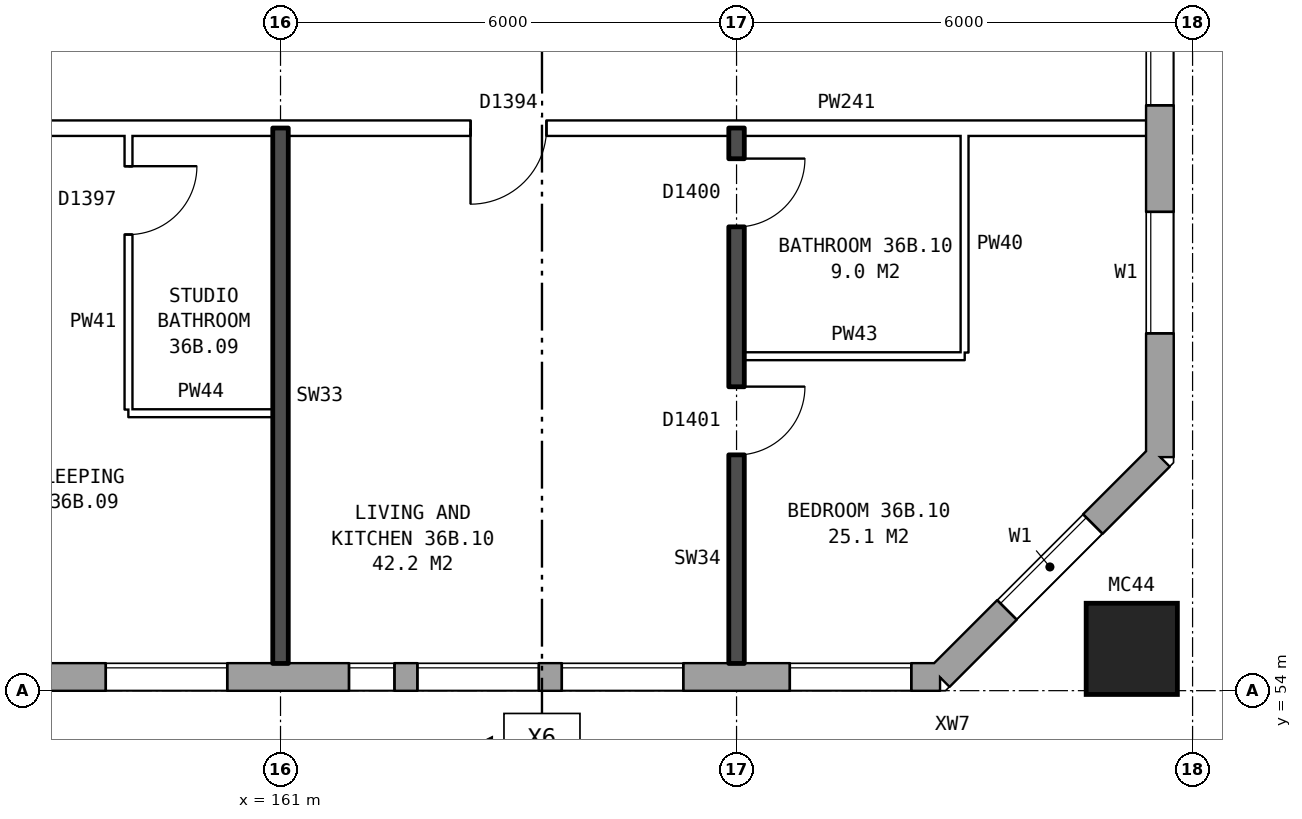
"""IFC4 building model, lengths in metres.
Left out: names, types, materials, properties, quantities, classifications, styles, units other than length and angle.
Written with IfcOpenShell. Run it as: python <this file> out.ifc"""

import sys

from ifc_helpers import new_model, si_unit, direction, frame, frame_2d, origin, origin_2d, place, context, subcontext, project, spatial, rectangle, hollow_rectangle, extrude, element, fill, save


model = new_model("IFC4")
c1 = context("Model", 3, precision=1e-05, world=origin(), true_north=direction((0.0, 1.0)))
c2 = subcontext(c1, "Body", "Model", "MODEL_VIEW")
j1 = project(units=[si_unit("LENGTHUNIT", "METRE"), si_unit("PLANEANGLEUNIT", "RADIAN")], contexts=[c1])
p1 = place(None, origin())
s1 = spatial("IfcSite", under=j1, at=p1, CompositionType="ELEMENT")
p2 = place(p1, origin())
s2 = spatial("IfcBuilding", under=s1, at=p2, CompositionType="ELEMENT")
p3 = place(p2, frame((0.0, 0.0, 129.9)))
s3 = spatial("IfcBuildingStorey", under=s2, at=p3, CompositionType="ELEMENT", Elevation=129.9)
p4 = place(p3, frame((172.2, 54.55, 0.0), z_axis=(0.0, 0.0, 1.0), x_axis=(1.0, 0.0, 0.0)))
e1 = element("IfcColumn", 1, at=p4, inside=s3, PredefinedType="COLUMN", context=c2, shape_type="SweptSolid", body=[
    extrude(hollow_rectangle(XDim=1.2, YDim=1.2, WallThickness=0.065, at=origin_2d()), origin(), (0.0, 0.0, 1.0), 3.1),
])
p5 = place(p3, frame((134.075, 54.18, 0.0), z_axis=(0.0, 0.0, 1.0), x_axis=(1.0, 0.0, 0.0)))
e2 = element("IfcWall", 2, at=p5, inside=s3, PredefinedType="STANDARD", context=c2, shape_type="SweptSolid", body=[
    extrude(rectangle(XDim=35.601, YDim=0.36, at=frame_2d((17.8, 0.0))), origin(), (0.0, 0.0, 1.0), 2.85),
])
p6 = place(p5, frame((0.625, 0.0, 0.8)))
e3 = element("IfcOpeningElement", 3, at=p6, cuts=e2, PredefinedType="OPENING", context=c2, shape_type="SweptSolid", body=[
    extrude(rectangle(XDim=1.6, YDim=1.8, at=frame_2d((0.8, 0.9))), frame((0.0, 0.19, 0.0), z_axis=(0.0, -1.0, 0.0), x_axis=(1.0, 0.0, 0.0)), (0.0, 0.0, 1.0), 0.38),
])
p7 = place(p5, frame((3.625, 0.0, 0.8)))
e4 = element("IfcOpeningElement", 4, at=p7, cuts=e2, PredefinedType="OPENING", context=c2, shape_type="SweptSolid", body=[
    extrude(rectangle(XDim=1.6, YDim=1.8, at=frame_2d((0.8, 0.9))), frame((0.0, 0.19, 0.0), z_axis=(0.0, -1.0, 0.0), x_axis=(1.0, 0.0, 0.0)), (0.0, 0.0, 1.0), 0.38),
])
p8 = place(p5, frame((5.525, 0.0, 0.8)))
e5 = element("IfcOpeningElement", 5, at=p8, cuts=e2, PredefinedType="OPENING", context=c2, shape_type="SweptSolid", body=[
    extrude(rectangle(XDim=1.2, YDim=1.8, at=frame_2d((0.6, 0.9))), frame((0.0, 0.19, 0.0), z_axis=(0.0, -1.0, 0.0), x_axis=(1.0, 0.0, 0.0)), (0.0, 0.0, 1.0), 0.38),
])
p9 = place(p5, frame((9.625, 0.0, 0.8)))
e6 = element("IfcOpeningElement", 6, at=p9, cuts=e2, PredefinedType="OPENING", context=c2, shape_type="SweptSolid", body=[
    extrude(rectangle(XDim=1.6, YDim=1.8, at=frame_2d((0.8, 0.9))), frame((0.0, 0.19, 0.0), z_axis=(0.0, -1.0, 0.0), x_axis=(1.0, 0.0, 0.0)), (0.0, 0.0, 1.0), 0.38),
])
p10 = place(p5, frame((12.625, 0.0, 0.8)))
e7 = element("IfcOpeningElement", 7, at=p10, cuts=e2, PredefinedType="OPENING", context=c2, shape_type="SweptSolid", body=[
    extrude(rectangle(XDim=1.6, YDim=1.8, at=frame_2d((0.8, 0.9))), frame((0.0, 0.19, 0.0), z_axis=(0.0, -1.0, 0.0), x_axis=(1.0, 0.0, 0.0)), (0.0, 0.0, 1.0), 0.38),
])
p11 = place(p5, frame((15.625, 0.0, 0.8)))
e8 = element("IfcOpeningElement", 8, at=p11, cuts=e2, PredefinedType="OPENING", context=c2, shape_type="SweptSolid", body=[
    extrude(rectangle(XDim=1.6, YDim=1.8, at=frame_2d((0.8, 0.9))), frame((0.0, 0.19, 0.0), z_axis=(0.0, -1.0, 0.0), x_axis=(1.0, 0.0, 0.0)), (0.0, 0.0, 1.0), 0.38),
])
p12 = place(p5, frame((18.625, 0.0, 0.8)))
e9 = element("IfcOpeningElement", 9, at=p12, cuts=e2, PredefinedType="OPENING", context=c2, shape_type="SweptSolid", body=[
    extrude(rectangle(XDim=1.6, YDim=1.8, at=frame_2d((0.8, 0.9))), frame((0.0, 0.19, 0.0), z_axis=(0.0, -1.0, 0.0), x_axis=(1.0, 0.0, 0.0)), (0.0, 0.0, 1.0), 0.38),
])
p13 = place(p5, frame((21.625, 0.0, 0.8)))
e10 = element("IfcOpeningElement", 10, at=p13, cuts=e2, PredefinedType="OPENING", context=c2, shape_type="SweptSolid", body=[
    extrude(rectangle(XDim=1.6, YDim=1.8, at=frame_2d((0.8, 0.9))), frame((0.0, 0.19, 0.0), z_axis=(0.0, -1.0, 0.0), x_axis=(1.0, 0.0, 0.0)), (0.0, 0.0, 1.0), 0.38),
])
p14 = place(p5, frame((24.625, 0.0, 0.8)))
e11 = element("IfcOpeningElement", 11, at=p14, cuts=e2, PredefinedType="OPENING", context=c2, shape_type="SweptSolid", body=[
    extrude(rectangle(XDim=1.6, YDim=1.8, at=frame_2d((0.8, 0.9))), frame((0.0, 0.19, 0.0), z_axis=(0.0, -1.0, 0.0), x_axis=(1.0, 0.0, 0.0)), (0.0, 0.0, 1.0), 0.38),
])
p15 = place(p5, frame((27.825, 0.0, 1.7)))
e12 = element("IfcOpeningElement", 12, at=p15, cuts=e2, PredefinedType="OPENING", context=c2, shape_type="SweptSolid", body=[
    extrude(rectangle(XDim=0.6, YDim=0.9, at=frame_2d((0.3, 0.45))), frame((0.0, 0.19, 0.0), z_axis=(0.0, -1.0, 0.0), x_axis=(1.0, 0.0, 0.0)), (0.0, 0.0, 1.0), 0.38),
])
p16 = place(p5, frame((30.625, 0.0, 0.8)))
e13 = element("IfcOpeningElement", 13, at=p16, cuts=e2, PredefinedType="OPENING", context=c2, shape_type="SweptSolid", body=[
    extrude(rectangle(XDim=1.6, YDim=1.8, at=frame_2d((0.8, 0.9))), frame((0.0, 0.19, 0.0), z_axis=(0.0, -1.0, 0.0), x_axis=(1.0, 0.0, 0.0)), (0.0, 0.0, 1.0), 0.38),
])
p17 = place(p5, frame((33.625, 0.0, 0.8)))
e14 = element("IfcOpeningElement", 14, at=p17, cuts=e2, PredefinedType="OPENING", context=c2, shape_type="SweptSolid", body=[
    extrude(rectangle(XDim=1.6, YDim=1.8, at=frame_2d((0.8, 0.9))), frame((0.0, 0.19, 0.0), z_axis=(0.0, -1.0, 0.0), x_axis=(1.0, 0.0, 0.0)), (0.0, 0.0, 1.0), 0.38),
])
p18 = place(p5, frame((7.025, 0.0, 1.6)))
e15 = element("IfcOpeningElement", 15, at=p18, cuts=e2, PredefinedType="OPENING", context=c2, shape_type="SweptSolid", body=[
    extrude(rectangle(XDim=0.6, YDim=0.9, at=frame_2d((0.3, 0.45))), frame((0.0, 0.19, 0.0), z_axis=(0.0, -1.0, 0.0), x_axis=(1.0, 0.0, 0.0)), (0.0, 0.0, 1.0), 0.38),
])
p19 = place(p5, frame((28.725, 0.0, 0.8)))
e16 = element("IfcOpeningElement", 16, at=p19, cuts=e2, PredefinedType="OPENING", context=c2, shape_type="SweptSolid", body=[
    extrude(rectangle(XDim=1.6, YDim=1.8, at=frame_2d((0.8, 0.9))), frame((0.0, 0.19, 0.0), z_axis=(0.0, -1.0, 0.0), x_axis=(1.0, 0.0, 0.0)), (0.0, 0.0, 1.0), 0.38),
])
p20 = place(p3, frame((169.675, 54.18, 0.0), z_axis=(0.0, 0.0, 1.0), x_axis=(0.707106781187, 0.707106781187, 0.0)))
e17 = element("IfcWall", 17, at=p20, inside=s3, PredefinedType="STANDARD", context=c2, shape_type="SweptSolid", body=[
    extrude(rectangle(XDim=4.094, YDim=0.36, at=frame_2d((2.047, 0.0))), origin(), (0.0, 0.0, 1.0), 2.85),
])
p21 = place(p20, frame((1.247, 0.0, 0.8)))
e18 = element("IfcOpeningElement", 18, at=p21, cuts=e17, PredefinedType="OPENING", context=c2, shape_type="SweptSolid", body=[
    extrude(rectangle(XDim=1.6, YDim=1.8, at=frame_2d((0.8, 0.9))), frame((0.0, 0.19, 0.0), z_axis=(0.0, -1.0, 0.0), x_axis=(1.0, 0.0, 0.0)), (0.0, 0.0, 1.0), 0.38),
])
p22 = place(p3, frame((172.57, 57.075, 0.0), z_axis=(0.0, 0.0, 1.0), x_axis=(0.0, 1.0, 0.0)))
e19 = element("IfcWall", 19, at=p22, inside=s3, PredefinedType="STANDARD", context=c2, shape_type="SweptSolid", body=[
    extrude(rectangle(XDim=25.851, YDim=0.36, at=frame_2d((12.925, 0.0))), origin(), (0.0, 0.0, 1.0), 2.85),
])
p23 = place(p22, frame((1.625, 0.0, 0.8)))
e20 = element("IfcOpeningElement", 20, at=p23, cuts=e19, PredefinedType="OPENING", context=c2, shape_type="SweptSolid", body=[
    extrude(rectangle(XDim=1.6, YDim=1.8, at=frame_2d((0.8, 0.9))), frame((0.0, 0.19, 0.0), z_axis=(0.0, -1.0, 0.0), x_axis=(1.0, 0.0, 0.0)), (0.0, 0.0, 1.0), 0.38),
])
p24 = place(p22, frame((4.625, 0.0, 0.8)))
e21 = element("IfcOpeningElement", 21, at=p24, cuts=e19, PredefinedType="OPENING", context=c2, shape_type="SweptSolid", body=[
    extrude(rectangle(XDim=1.6, YDim=1.8, at=frame_2d((0.8, 0.9))), frame((0.0, 0.19, 0.0), z_axis=(0.0, -1.0, 0.0), x_axis=(1.0, 0.0, 0.0)), (0.0, 0.0, 1.0), 0.38),
])
p25 = place(p22, frame((7.625, 0.0, 0.8)))
e22 = element("IfcOpeningElement", 22, at=p25, cuts=e19, PredefinedType="OPENING", context=c2, shape_type="SweptSolid", body=[
    extrude(rectangle(XDim=1.6, YDim=1.8, at=frame_2d((0.8, 0.9))), frame((0.0, 0.19, 0.0), z_axis=(0.0, -1.0, 0.0), x_axis=(1.0, 0.0, 0.0)), (0.0, 0.0, 1.0), 0.38),
])
p26 = place(p22, frame((6.525, 0.0, 0.8)))
e23 = element("IfcOpeningElement", 23, at=p26, cuts=e19, PredefinedType="OPENING", context=c2, shape_type="SweptSolid", body=[
    extrude(rectangle(XDim=0.8, YDim=1.8, at=frame_2d((0.4, 0.9))), frame((0.0, 0.19, 0.0), z_axis=(0.0, -1.0, 0.0), x_axis=(1.0, 0.0, 0.0)), (0.0, 0.0, 1.0), 0.38),
])
p27 = place(p22, frame((9.525, 0.0, 0.8)))
e24 = element("IfcOpeningElement", 24, at=p27, cuts=e19, PredefinedType="OPENING", context=c2, shape_type="SweptSolid", body=[
    extrude(rectangle(XDim=1.4, YDim=1.2, at=frame_2d((0.7, 0.6))), frame((0.0, 0.19, 0.0), z_axis=(0.0, -1.0, 0.0), x_axis=(1.0, 0.0, 0.0)), (0.0, 0.0, 1.0), 0.38),
])
p28 = place(p22, frame((16.625, 0.0, 0.8)))
e25 = element("IfcOpeningElement", 25, at=p28, cuts=e19, PredefinedType="OPENING", context=c2, shape_type="SweptSolid", body=[
    extrude(rectangle(XDim=1.6, YDim=1.8, at=frame_2d((0.8, 0.9))), frame((0.0, 0.19, 0.0), z_axis=(0.0, -1.0, 0.0), x_axis=(1.0, 0.0, 0.0)), (0.0, 0.0, 1.0), 0.38),
])
p29 = place(p22, frame((19.625, 0.0, 0.8)))
e26 = element("IfcOpeningElement", 26, at=p29, cuts=e19, PredefinedType="OPENING", context=c2, shape_type="SweptSolid", body=[
    extrude(rectangle(XDim=1.6, YDim=1.8, at=frame_2d((0.8, 0.9))), frame((0.0, 0.19, 0.0), z_axis=(0.0, -1.0, 0.0), x_axis=(1.0, 0.0, 0.0)), (0.0, 0.0, 1.0), 0.38),
])
p30 = place(p22, frame((22.625, 0.0, 0.8)))
e27 = element("IfcOpeningElement", 27, at=p30, cuts=e19, PredefinedType="OPENING", context=c2, shape_type="SweptSolid", body=[
    extrude(rectangle(XDim=1.6, YDim=1.8, at=frame_2d((0.8, 0.9))), frame((0.0, 0.19, 0.0), z_axis=(0.0, -1.0, 0.0), x_axis=(1.0, 0.0, 0.0)), (0.0, 0.0, 1.0), 0.38),
])
p31 = place(p22, frame((12.275, 0.0, 0.8)))
e28 = element("IfcOpeningElement", 28, at=p31, cuts=e19, PredefinedType="OPENING", context=c2, shape_type="SweptSolid", body=[
    extrude(rectangle(XDim=1.2, YDim=1.8, at=frame_2d((0.6, 0.9))), frame((0.0, 0.19, 0.0), z_axis=(0.0, -1.0, 0.0), x_axis=(1.0, 0.0, 0.0)), (0.0, 0.0, 1.0), 0.38),
])
p32 = place(p22, frame((14.425, 0.0, 0.8)))
e29 = element("IfcOpeningElement", 29, at=p32, cuts=e19, PredefinedType="OPENING", context=c2, shape_type="SweptSolid", body=[
    extrude(rectangle(XDim=1.2, YDim=0.9, at=frame_2d((0.6, 0.45))), frame((0.0, 0.19, 0.0), z_axis=(0.0, -1.0, 0.0), x_axis=(1.0, 0.0, 0.0)), (0.0, 0.0, 1.0), 0.38),
])
p33 = place(p22, frame((18.525, 0.0, 0.8)))
e30 = element("IfcOpeningElement", 30, at=p33, cuts=e19, PredefinedType="OPENING", context=c2, shape_type="SweptSolid", body=[
    extrude(rectangle(XDim=0.6, YDim=1.8, at=frame_2d((0.3, 0.9))), frame((0.0, 0.19, 0.0), z_axis=(0.0, -1.0, 0.0), x_axis=(1.0, 0.0, 0.0)), (0.0, 0.0, 1.0), 0.38),
])
p34 = place(p3, frame((159.0, 57.65, 0.0), z_axis=(0.0, 0.0, 1.0), x_axis=(1.0, 0.0, 0.0)))
e31 = element("IfcWall", 31, at=p34, inside=s3, PredefinedType="PARTITIONING", context=c2, shape_type="SweptSolid", body=[
    extrude(rectangle(XDim=1.9, YDim=0.1, at=frame_2d((0.95, 0.0))), origin(), (0.0, 0.0, 1.0), 2.85),
])
p35 = place(p3, frame((167.1, 58.4, 0.0), z_axis=(0.0, 0.0, 1.0), x_axis=(1.0, 0.0, 0.0)))
e32 = element("IfcWall", 32, at=p35, inside=s3, PredefinedType="PARTITIONING", context=c2, shape_type="SweptSolid", body=[
    extrude(rectangle(XDim=2.9, YDim=0.1, at=frame_2d((1.45, 0.0))), origin(), (0.0, 0.0, 1.0), 2.85),
])
p36 = place(p3, frame((155.1, 61.4, 0.0), z_axis=(0.0, 0.0, 1.0), x_axis=(1.0, 0.0, 0.0)))
e33 = element("IfcWall", 33, at=p36, inside=s3, PredefinedType="PARTITIONING", context=c2, shape_type="SweptSolid", body=[
    extrude(rectangle(XDim=17.29, YDim=0.2, at=frame_2d((8.645, 0.0))), origin(), (0.0, 0.0, 1.0), 2.85),
])
p37 = place(p36, frame((1.45, 0.0, 0.0)))
e34 = element("IfcOpeningElement", 34, at=p37, cuts=e33, PredefinedType="OPENING", context=c2, shape_type="SweptSolid", body=[
    extrude(rectangle(XDim=1.0, YDim=2.1, at=frame_2d((0.5, 1.05))), frame((0.0, 0.11, 0.0), z_axis=(0.0, -1.0, 0.0), x_axis=(1.0, 0.0, 0.0)), (0.0, 0.0, 1.0), 0.22),
])
p38 = place(p36, frame((8.4, 0.0, 0.0)))
e35 = element("IfcOpeningElement", 35, at=p38, cuts=e33, PredefinedType="OPENING", context=c2, shape_type="SweptSolid", body=[
    extrude(rectangle(XDim=1.0, YDim=2.1, at=frame_2d((0.5, 1.05))), frame((0.0, 0.11, 0.0), z_axis=(0.0, -1.0, 0.0), x_axis=(1.0, 0.0, 0.0)), (0.0, 0.0, 1.0), 0.22),
])
p39 = place(p3, frame((159.0, 57.7, 0.0), z_axis=(0.0, 0.0, 1.0), x_axis=(0.0, 1.0, 0.0)))
e36 = element("IfcWall", 36, at=p39, inside=s3, PredefinedType="PARTITIONING", context=c2, shape_type="SweptSolid", body=[
    extrude(rectangle(XDim=3.6, YDim=0.1, at=frame_2d((1.8, 0.0))), origin(), (0.0, 0.0, 1.0), 2.85),
])
p40 = place(p39, frame((2.3, 0.0, 0.0)))
e37 = element("IfcOpeningElement", 37, at=p40, cuts=e36, PredefinedType="OPENING", context=c2, shape_type="SweptSolid", body=[
    extrude(rectangle(XDim=0.9, YDim=2.1, at=frame_2d((0.45, 1.05))), frame((0.0, 0.06, 0.0), z_axis=(0.0, -1.0, 0.0), x_axis=(1.0, 0.0, 0.0)), (0.0, 0.0, 1.0), 0.12),
])
p41 = place(p3, frame((161.0, 54.36, 0.0), z_axis=(0.0, 0.0, 1.0), x_axis=(0.0, 1.0, 0.0)))
e38 = element("IfcWall", 38, at=p41, inside=s3, PredefinedType="SOLIDWALL", context=c2, shape_type="SweptSolid", body=[
    extrude(rectangle(XDim=7.04, YDim=0.2, at=frame_2d((3.52, 0.0))), origin(), (0.0, 0.0, 1.0), 2.85),
])
p42 = place(p3, frame((167.0, 54.36, 0.0), z_axis=(0.0, 0.0, 1.0), x_axis=(0.0, 1.0, 0.0)))
e39 = element("IfcWall", 39, at=p42, inside=s3, PredefinedType="SOLIDWALL", context=c2, shape_type="SweptSolid", body=[
    extrude(rectangle(XDim=7.04, YDim=0.2, at=frame_2d((3.52, 0.0))), origin(), (0.0, 0.0, 1.0), 2.85),
])
p43 = place(p42, frame((2.74, 0.0, 0.0)))
e40 = element("IfcOpeningElement", 40, at=p43, cuts=e39, PredefinedType="OPENING", context=c2, shape_type="SweptSolid", body=[
    extrude(rectangle(XDim=0.9, YDim=2.1, at=frame_2d((0.45, 1.05))), frame((0.0, 0.11, 0.0), z_axis=(0.0, -1.0, 0.0), x_axis=(1.0, 0.0, 0.0)), (0.0, 0.0, 1.0), 0.22),
])
p44 = place(p42, frame((5.74, 0.0, 0.0)))
e41 = element("IfcOpeningElement", 41, at=p44, cuts=e39, PredefinedType="OPENING", context=c2, shape_type="SweptSolid", body=[
    extrude(rectangle(XDim=0.9, YDim=2.1, at=frame_2d((0.45, 1.05))), frame((0.0, 0.11, 0.0), z_axis=(0.0, -1.0, 0.0), x_axis=(1.0, 0.0, 0.0)), (0.0, 0.0, 1.0), 0.22),
])
p45 = place(p3, frame((170.0, 58.45, 0.0), z_axis=(0.0, 0.0, 1.0), x_axis=(0.0, 1.0, 0.0)))
e42 = element("IfcWall", 42, at=p45, inside=s3, PredefinedType="PARTITIONING", context=c2, shape_type="SweptSolid", body=[
    extrude(rectangle(XDim=2.85, YDim=0.1, at=frame_2d((1.425, 0.0))), origin(), (0.0, 0.0, 1.0), 2.85),
])
p46 = place(p14, origin())
e43 = element("IfcWindow", 43, at=p46, inside=s3, PartitioningType="SINGLE_PANEL", PredefinedType="WINDOW", context=c2, shape_type="SweptSolid", body=[
    extrude(rectangle(XDim=1.6, YDim=1.8, at=frame_2d((0.8, 0.9))), frame((0.0, 0.15, 0.0), z_axis=(0.0, -1.0, 0.0), x_axis=(1.0, 0.0, 0.0)), (0.0, 0.0, 1.0), 0.06),
])
fill(e11, e43)
p47 = place(p15, origin())
e44 = element("IfcWindow", 44, at=p47, inside=s3, PartitioningType="SINGLE_PANEL", PredefinedType="WINDOW", context=c2, shape_type="SweptSolid", body=[
    extrude(rectangle(XDim=0.6, YDim=0.9, at=frame_2d((0.3, 0.45))), frame((0.0, 0.15, 0.0), z_axis=(0.0, -1.0, 0.0), x_axis=(1.0, 0.0, 0.0)), (0.0, 0.0, 1.0), 0.06),
])
fill(e12, e44)
p48 = place(p16, origin())
e45 = element("IfcWindow", 45, at=p48, inside=s3, PartitioningType="SINGLE_PANEL", PredefinedType="WINDOW", context=c2, shape_type="SweptSolid", body=[
    extrude(rectangle(XDim=1.6, YDim=1.8, at=frame_2d((0.8, 0.9))), frame((0.0, 0.15, 0.0), z_axis=(0.0, -1.0, 0.0), x_axis=(1.0, 0.0, 0.0)), (0.0, 0.0, 1.0), 0.06),
])
fill(e13, e45)
p49 = place(p17, origin())
e46 = element("IfcWindow", 46, at=p49, inside=s3, PartitioningType="SINGLE_PANEL", PredefinedType="WINDOW", context=c2, shape_type="SweptSolid", body=[
    extrude(rectangle(XDim=1.6, YDim=1.8, at=frame_2d((0.8, 0.9))), frame((0.0, 0.15, 0.0), z_axis=(0.0, -1.0, 0.0), x_axis=(1.0, 0.0, 0.0)), (0.0, 0.0, 1.0), 0.06),
])
fill(e14, e46)
p50 = place(p21, origin())
e47 = element("IfcWindow", 47, at=p50, inside=s3, PartitioningType="SINGLE_PANEL", PredefinedType="WINDOW", context=c2, shape_type="SweptSolid", body=[
    extrude(rectangle(XDim=1.6, YDim=1.8, at=frame_2d((0.8, 0.9))), frame((0.0, 0.15, 0.0), z_axis=(0.0, -1.0, 0.0), x_axis=(1.0, 0.0, 0.0)), (0.0, 0.0, 1.0), 0.06),
])
fill(e18, e47)
p51 = place(p23, origin())
e48 = element("IfcWindow", 48, at=p51, inside=s3, PartitioningType="SINGLE_PANEL", PredefinedType="WINDOW", context=c2, shape_type="SweptSolid", body=[
    extrude(rectangle(XDim=1.6, YDim=1.8, at=frame_2d((0.8, 0.9))), frame((0.0, 0.15, 0.0), z_axis=(0.0, -1.0, 0.0), x_axis=(1.0, 0.0, 0.0)), (0.0, 0.0, 1.0), 0.06),
])
fill(e20, e48)
p52 = place(p24, origin())
e49 = element("IfcWindow", 49, at=p52, inside=s3, PartitioningType="SINGLE_PANEL", PredefinedType="WINDOW", context=c2, shape_type="SweptSolid", body=[
    extrude(rectangle(XDim=1.6, YDim=1.8, at=frame_2d((0.8, 0.9))), frame((0.0, 0.15, 0.0), z_axis=(0.0, -1.0, 0.0), x_axis=(1.0, 0.0, 0.0)), (0.0, 0.0, 1.0), 0.06),
])
fill(e21, e49)
p53 = place(p40, frame((0.9, 0.0, 0.0), z_axis=(0.0, 0.0, 1.0), x_axis=(-1.0, 0.0, 0.0)))
e50 = element("IfcDoor", 50, at=p53, inside=s3, OperationType="SINGLE_SWING_LEFT", PredefinedType="DOOR", context=c2, shape_type="SweptSolid", body=[
    extrude(rectangle(XDim=0.9, YDim=2.1, at=frame_2d((0.45, 1.05))), frame((0.0, 0.025, 0.0), z_axis=(0.0, -1.0, 0.0), x_axis=(1.0, 0.0, 0.0)), (0.0, 0.0, 1.0), 0.05),
])
fill(e37, e50)
p54 = place(p43, frame((0.9, 0.0, 0.0), z_axis=(0.0, 0.0, 1.0), x_axis=(-1.0, 0.0, 0.0)))
e51 = element("IfcDoor", 51, at=p54, inside=s3, OperationType="SINGLE_SWING_LEFT", PredefinedType="DOOR", context=c2, shape_type="SweptSolid", body=[
    extrude(rectangle(XDim=0.9, YDim=2.1, at=frame_2d((0.45, 1.05))), frame((0.0, 0.025, 0.0), z_axis=(0.0, -1.0, 0.0), x_axis=(1.0, 0.0, 0.0)), (0.0, 0.0, 1.0), 0.05),
])
fill(e40, e51)
p55 = place(p38, frame((1.0, 0.0, 0.0), z_axis=(0.0, 0.0, 1.0), x_axis=(-1.0, 0.0, 0.0)))
e52 = element("IfcDoor", 52, at=p55, inside=s3, OperationType="SINGLE_SWING_RIGHT", PredefinedType="DOOR", context=c2, shape_type="SweptSolid", body=[
    extrude(rectangle(XDim=1.0, YDim=2.1, at=frame_2d((0.5, 1.05))), frame((0.0, 0.025, 0.0), z_axis=(0.0, -1.0, 0.0), x_axis=(1.0, 0.0, 0.0)), (0.0, 0.0, 1.0), 0.05),
])
fill(e35, e52)
p56 = place(p44, frame((0.9, 0.0, 0.0), z_axis=(0.0, 0.0, 1.0), x_axis=(-1.0, 0.0, 0.0)))
e53 = element("IfcDoor", 53, at=p56, inside=s3, OperationType="SINGLE_SWING_LEFT", PredefinedType="DOOR", context=c2, shape_type="SweptSolid", body=[
    extrude(rectangle(XDim=0.9, YDim=2.1, at=frame_2d((0.45, 1.05))), frame((0.0, 0.025, 0.0), z_axis=(0.0, -1.0, 0.0), x_axis=(1.0, 0.0, 0.0)), (0.0, 0.0, 1.0), 0.05),
])
fill(e41, e53)
p57 = place(p19, origin())
e54 = element("IfcWindow", 54, at=p57, inside=s3, PartitioningType="SINGLE_PANEL", PredefinedType="WINDOW", context=c2, shape_type="SweptSolid", body=[
    extrude(rectangle(XDim=1.6, YDim=1.8, at=frame_2d((0.8, 0.9))), frame((0.0, 0.15, 0.0), z_axis=(0.0, -1.0, 0.0), x_axis=(1.0, 0.0, 0.0)), (0.0, 0.0, 1.0), 0.06),
])
fill(e16, e54)
save(model, sys.argv[1])
